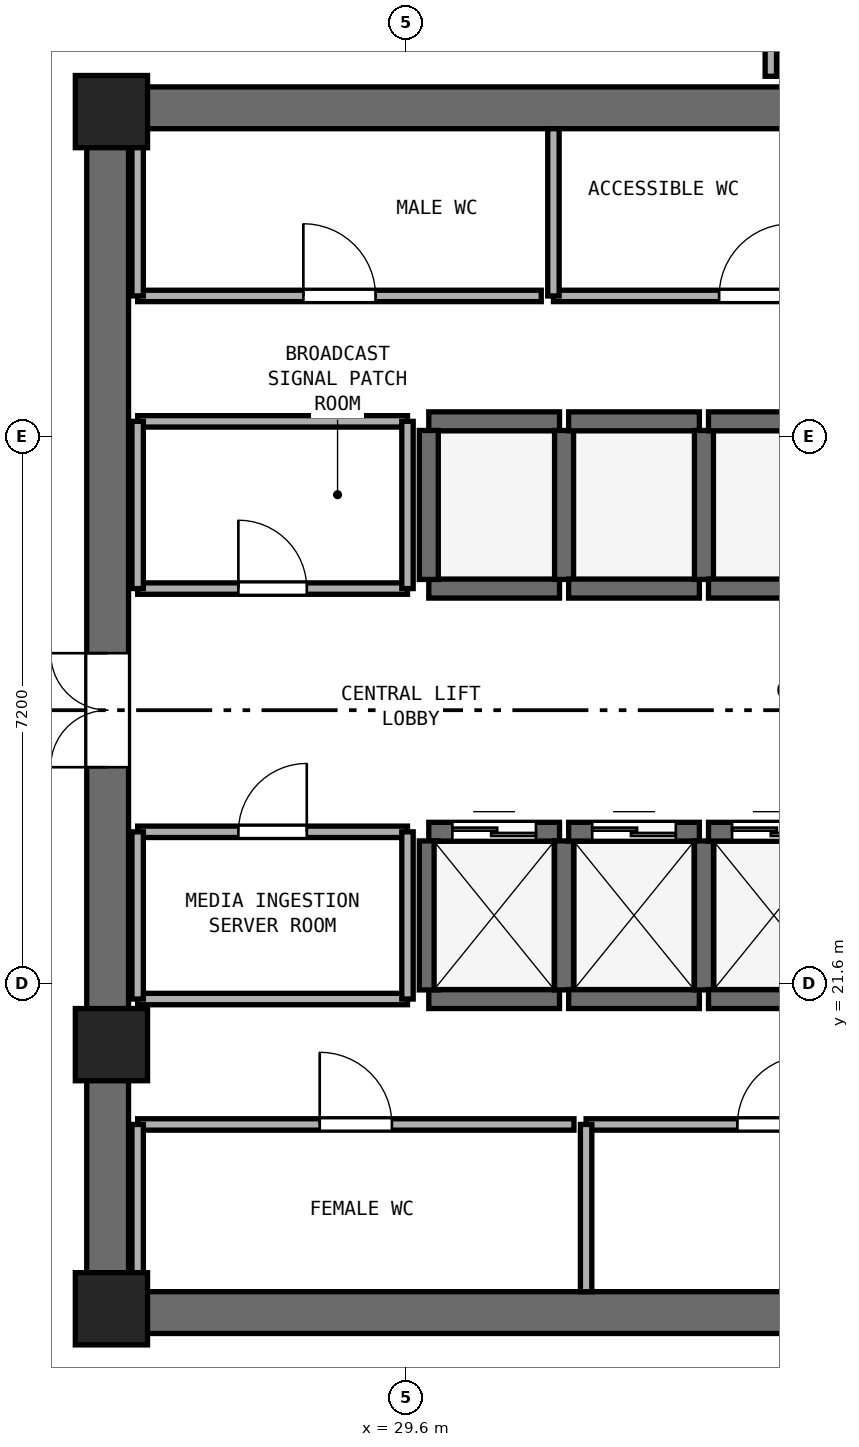
"""IFC4 building model, lengths in metres.
Left out: names, types, materials, properties, quantities, classifications, styles, units other than length and angle.
Written with IfcOpenShell. Run it as: python <this file> out.ifc"""

import sys

from ifc_helpers import new_model, si_unit, direction, frame, frame_2d, origin, origin_2d, place, context, subcontext, project, spatial, rectangle, extrude, element, fill, save


model = new_model("IFC4")
c1 = context("Model", 3, precision=1e-05, world=origin(), true_north=direction((0.0, 1.0)))
c2 = subcontext(c1, "Body", "Model", "MODEL_VIEW")
j1 = project(units=[si_unit("LENGTHUNIT", "METRE"), si_unit("PLANEANGLEUNIT", "RADIAN")], contexts=[c1])
p1 = place(None, origin())
s1 = spatial("IfcSite", under=j1, at=p1, CompositionType="ELEMENT")
p2 = place(p1, origin())
s2 = spatial("IfcBuilding", under=s1, at=p2, CompositionType="ELEMENT")
p3 = place(p2, frame((0.0, 0.0, 212.4)))
s3 = spatial("IfcBuildingStorey", under=s2, at=p3, CompositionType="ELEMENT", Elevation=212.4)
for number, where, z_axis, x_axis in (
    (1, (25.4, 17.275, 0.0), (0.0, 0.0, 1.0), (1.0, 0.0, 0.0)),
    (2, (25.4, 33.125, 0.0), (0.0, 0.0, 1.0), (1.0, 0.0, 0.0)),
):
    element("IfcWall", number, at=place(p3, frame(where, z_axis=z_axis, x_axis=x_axis)), inside=s3, PredefinedType="SHEAR", context=c2, shape_type="SweptSolid", body=[
        extrude(rectangle(XDim=23.2, YDim=0.55, at=frame_2d((11.6, 0.0))), origin(), (0.0, 0.0, 1.0), 3.54),
    ])
p4 = place(p3, frame((25.675, 17.55, 0.0), z_axis=(0.0, 0.0, 1.0), x_axis=(0.0, 1.0, 0.0)))
e3 = element("IfcWall", 3, at=p4, inside=s3, PredefinedType="SHEAR", context=c2, shape_type="SweptSolid", body=[
    extrude(rectangle(XDim=15.3, YDim=0.55, at=frame_2d((7.65, 0.0))), origin(), (0.0, 0.0, 1.0), 3.54),
])
p5 = place(p4, frame((6.9, 0.0, 0.0)))
e4 = element("IfcOpeningElement", 4, at=p5, cuts=e3, PredefinedType="OPENING", context=c2, shape_type="SweptSolid", body=[
    extrude(rectangle(XDim=1.5, YDim=2.15, at=frame_2d((0.75, 1.075))), frame((0.0, 0.285, 0.0), z_axis=(0.0, -1.0, 0.0), x_axis=(1.0, 0.0, 0.0)), (0.0, 0.0, 1.0), 0.57),
])
for number, where, z_axis, x_axis in (
    (5, (25.725, 17.325, 0.0), (0.0, 0.0, 1.0), (1.0, 0.0, 0.0)),
    (6, (25.725, 33.075, 0.0), (0.0, 0.0, 1.0), (1.0, 0.0, 0.0)),
    (7, (25.725, 20.8, 0.0), (0.0, 0.0, 1.0), (1.0, 0.0, 0.0)),
):
    element("IfcColumn", number, at=place(p3, frame(where, z_axis=z_axis, x_axis=x_axis)), inside=s3, PredefinedType="PILASTER", context=c2, shape_type="SweptSolid", body=[
        extrude(rectangle(XDim=0.95, YDim=0.95, at=origin_2d()), origin(), (0.0, 0.0, 1.0), 3.8),
    ])
p6 = place(p3, frame((29.9, 21.4, 0.0), z_axis=(0.0, 0.0, 1.0), x_axis=(1.0, 0.0, 0.0)))
e8 = element("IfcWall", 8, at=p6, inside=s3, PredefinedType="SHEAR", context=c2, shape_type="SweptSolid", body=[
    extrude(rectangle(XDim=1.72, YDim=0.25, at=frame_2d((0.86, 0.0))), origin(), (0.0, 0.0, 1.0), 3.54),
])
p7 = place(p3, frame((29.9, 23.6, 0.0), z_axis=(0.0, 0.0, 1.0), x_axis=(1.0, 0.0, 0.0)))
e9 = element("IfcWall", 9, at=p7, inside=s3, PredefinedType="SHEAR", context=c2, shape_type="SweptSolid", body=[
    extrude(rectangle(XDim=1.72, YDim=0.25, at=frame_2d((0.86, 0.0))), origin(), (0.0, 0.0, 1.0), 3.54),
])
p8 = place(p7, frame((0.31, 0.0, 0.0)))
e10 = element("IfcOpeningElement", 10, at=p8, cuts=e9, PredefinedType="OPENING", context=c2, shape_type="SweptSolid", body=[
    extrude(rectangle(XDim=1.1, YDim=2.15, at=frame_2d((0.55, 1.075))), frame((0.0, 0.135, 0.0), z_axis=(0.0, -1.0, 0.0), x_axis=(1.0, 0.0, 0.0)), (0.0, 0.0, 1.0), 0.27),
])
for number, where, z_axis, x_axis in (
    (11, (29.9, 21.52, 0.0), (0.0, 0.0, 1.0), (0.0, 1.0, 0.0)),
    (12, (31.68, 21.52, 0.0), (0.0, 0.0, 1.0), (0.0, 1.0, 0.0)),
):
    element("IfcWall", number, at=place(p3, frame(where, z_axis=z_axis, x_axis=x_axis)), inside=s3, PredefinedType="SHEAR", context=c2, shape_type="SweptSolid", body=[
        extrude(rectangle(XDim=1.96, YDim=0.25, at=frame_2d((0.98, 0.0))), origin(), (0.0, 0.0, 1.0), 3.54),
    ])
p9 = place(p3, frame((31.74, 21.4, 0.0), z_axis=(0.0, 0.0, 1.0), x_axis=(1.0, 0.0, 0.0)))
e13 = element("IfcWall", 13, at=p9, inside=s3, PredefinedType="SHEAR", context=c2, shape_type="SweptSolid", body=[
    extrude(rectangle(XDim=1.72, YDim=0.25, at=frame_2d((0.86, 0.0))), origin(), (0.0, 0.0, 1.0), 3.54),
])
p10 = place(p3, frame((31.74, 23.6, 0.0), z_axis=(0.0, 0.0, 1.0), x_axis=(1.0, 0.0, 0.0)))
e14 = element("IfcWall", 14, at=p10, inside=s3, PredefinedType="SHEAR", context=c2, shape_type="SweptSolid", body=[
    extrude(rectangle(XDim=1.72, YDim=0.25, at=frame_2d((0.86, 0.0))), origin(), (0.0, 0.0, 1.0), 3.54),
])
p11 = place(p10, frame((0.31, 0.0, 0.0)))
e15 = element("IfcOpeningElement", 15, at=p11, cuts=e14, PredefinedType="OPENING", context=c2, shape_type="SweptSolid", body=[
    extrude(rectangle(XDim=1.1, YDim=2.15, at=frame_2d((0.55, 1.075))), frame((0.0, 0.135, 0.0), z_axis=(0.0, -1.0, 0.0), x_axis=(1.0, 0.0, 0.0)), (0.0, 0.0, 1.0), 0.27),
])
p12 = place(p3, frame((33.52, 21.52, 0.0), z_axis=(0.0, 0.0, 1.0), x_axis=(0.0, 1.0, 0.0)))
e16 = element("IfcWall", 16, at=p12, inside=s3, PredefinedType="SHEAR", context=c2, shape_type="SweptSolid", body=[
    extrude(rectangle(XDim=1.96, YDim=0.25, at=frame_2d((0.98, 0.0))), origin(), (0.0, 0.0, 1.0), 3.54),
])
p13 = place(p3, frame((33.58, 21.4, 0.0), z_axis=(0.0, 0.0, 1.0), x_axis=(1.0, 0.0, 0.0)))
e17 = element("IfcWall", 17, at=p13, inside=s3, PredefinedType="SHEAR", context=c2, shape_type="SweptSolid", body=[
    extrude(rectangle(XDim=1.72, YDim=0.25, at=frame_2d((0.86, 0.0))), origin(), (0.0, 0.0, 1.0), 3.54),
])
p14 = place(p3, frame((33.58, 23.6, 0.0), z_axis=(0.0, 0.0, 1.0), x_axis=(1.0, 0.0, 0.0)))
e18 = element("IfcWall", 18, at=p14, inside=s3, PredefinedType="SHEAR", context=c2, shape_type="SweptSolid", body=[
    extrude(rectangle(XDim=1.72, YDim=0.25, at=frame_2d((0.86, 0.0))), origin(), (0.0, 0.0, 1.0), 3.54),
])
p15 = place(p14, frame((0.31, 0.0, 0.0)))
e19 = element("IfcOpeningElement", 19, at=p15, cuts=e18, PredefinedType="OPENING", context=c2, shape_type="SweptSolid", body=[
    extrude(rectangle(XDim=1.1, YDim=2.15, at=frame_2d((0.55, 1.075))), frame((0.0, 0.135, 0.0), z_axis=(0.0, -1.0, 0.0), x_axis=(1.0, 0.0, 0.0)), (0.0, 0.0, 1.0), 0.27),
])
for number, where, z_axis, x_axis in (
    (20, (29.9, 26.8, 0.0), (0.0, 0.0, 1.0), (1.0, 0.0, 0.0)),
    (21, (29.9, 29.0, 0.0), (0.0, 0.0, 1.0), (1.0, 0.0, 0.0)),
):
    element("IfcWall", number, at=place(p3, frame(where, z_axis=z_axis, x_axis=x_axis)), inside=s3, PredefinedType="SHEAR", context=c2, shape_type="SweptSolid", body=[
        extrude(rectangle(XDim=1.72, YDim=0.25, at=frame_2d((0.86, 0.0))), origin(), (0.0, 0.0, 1.0), 3.54),
    ])
for number, where, z_axis, x_axis in (
    (22, (29.9, 26.92, 0.0), (0.0, 0.0, 1.0), (0.0, 1.0, 0.0)),
    (23, (31.68, 26.92, 0.0), (0.0, 0.0, 1.0), (0.0, 1.0, 0.0)),
):
    element("IfcWall", number, at=place(p3, frame(where, z_axis=z_axis, x_axis=x_axis)), inside=s3, PredefinedType="SHEAR", context=c2, shape_type="SweptSolid", body=[
        extrude(rectangle(XDim=1.96, YDim=0.25, at=frame_2d((0.98, 0.0))), origin(), (0.0, 0.0, 1.0), 3.54),
    ])
for number, where, z_axis, x_axis in (
    (24, (31.74, 26.8, 0.0), (0.0, 0.0, 1.0), (1.0, 0.0, 0.0)),
    (25, (31.74, 29.0, 0.0), (0.0, 0.0, 1.0), (1.0, 0.0, 0.0)),
):
    element("IfcWall", number, at=place(p3, frame(where, z_axis=z_axis, x_axis=x_axis)), inside=s3, PredefinedType="SHEAR", context=c2, shape_type="SweptSolid", body=[
        extrude(rectangle(XDim=1.72, YDim=0.25, at=frame_2d((0.86, 0.0))), origin(), (0.0, 0.0, 1.0), 3.54),
    ])
p16 = place(p3, frame((33.52, 26.92, 0.0), z_axis=(0.0, 0.0, 1.0), x_axis=(0.0, 1.0, 0.0)))
e26 = element("IfcWall", 26, at=p16, inside=s3, PredefinedType="SHEAR", context=c2, shape_type="SweptSolid", body=[
    extrude(rectangle(XDim=1.96, YDim=0.25, at=frame_2d((0.98, 0.0))), origin(), (0.0, 0.0, 1.0), 3.54),
])
for number, where, z_axis, x_axis in (
    (27, (33.58, 26.8, 0.0), (0.0, 0.0, 1.0), (1.0, 0.0, 0.0)),
    (28, (33.58, 29.0, 0.0), (0.0, 0.0, 1.0), (1.0, 0.0, 0.0)),
):
    element("IfcWall", number, at=place(p3, frame(where, z_axis=z_axis, x_axis=x_axis)), inside=s3, PredefinedType="SHEAR", context=c2, shape_type="SweptSolid", body=[
        extrude(rectangle(XDim=1.72, YDim=0.25, at=frame_2d((0.86, 0.0))), origin(), (0.0, 0.0, 1.0), 3.54),
    ])
p17 = place(p3, frame((26.07, 30.65, 0.0), z_axis=(0.0, 0.0, 1.0), x_axis=(1.0, 0.0, 0.0)))
e29 = element("IfcWall", 29, at=p17, inside=s3, PredefinedType="PARTITIONING", context=c2, shape_type="SweptSolid", body=[
    extrude(rectangle(XDim=5.31, YDim=0.15, at=frame_2d((2.655, 0.0))), origin(), (0.0, 0.0, 1.0), 3.54),
])
p18 = place(p17, frame((2.18, 0.0, 0.0)))
e30 = element("IfcOpeningElement", 30, at=p18, cuts=e29, PredefinedType="OPENING", context=c2, shape_type="SweptSolid", body=[
    extrude(rectangle(XDim=0.95, YDim=2.1, at=frame_2d((0.475, 1.05))), frame((0.0, 0.085, 0.0), z_axis=(0.0, -1.0, 0.0), x_axis=(1.0, 0.0, 0.0)), (0.0, 0.0, 1.0), 0.17),
])
p19 = place(p3, frame((26.07, 30.65, 0.0), z_axis=(0.0, 0.0, 1.0), x_axis=(0.0, 1.0, 0.0)))
e31 = element("IfcWall", 31, at=p19, inside=s3, PredefinedType="PARTITIONING", context=c2, shape_type="SweptSolid", body=[
    extrude(rectangle(XDim=2.2, YDim=0.15, at=frame_2d((1.1, 0.0))), origin(), (0.0, 0.0, 1.0), 2.64),
])
p20 = place(p3, frame((31.54, 30.65, 0.0), z_axis=(0.0, 0.0, 1.0), x_axis=(1.0, 0.0, 0.0)))
e32 = element("IfcWall", 32, at=p20, inside=s3, PredefinedType="PARTITIONING", context=c2, shape_type="SweptSolid", body=[
    extrude(rectangle(XDim=5.31, YDim=0.15, at=frame_2d((2.655, 0.0))), origin(), (0.0, 0.0, 1.0), 3.54),
])
p21 = place(p20, frame((2.18, 0.0, 0.0)))
e33 = element("IfcOpeningElement", 33, at=p21, cuts=e32, PredefinedType="OPENING", context=c2, shape_type="SweptSolid", body=[
    extrude(rectangle(XDim=0.95, YDim=2.1, at=frame_2d((0.475, 1.05))), frame((0.0, 0.085, 0.0), z_axis=(0.0, -1.0, 0.0), x_axis=(1.0, 0.0, 0.0)), (0.0, 0.0, 1.0), 0.17),
])
p22 = place(p3, frame((31.54, 30.65, 0.0), z_axis=(0.0, 0.0, 1.0), x_axis=(0.0, 1.0, 0.0)))
e34 = element("IfcWall", 34, at=p22, inside=s3, PredefinedType="PARTITIONING", context=c2, shape_type="SweptSolid", body=[
    extrude(rectangle(XDim=2.2, YDim=0.15, at=frame_2d((1.1, 0.0))), origin(), (0.0, 0.0, 1.0), 3.54),
])
p23 = place(p3, frame((26.07, 19.75, 0.0), z_axis=(0.0, 0.0, 1.0), x_axis=(1.0, 0.0, 0.0)))
e35 = element("IfcWall", 35, at=p23, inside=s3, PredefinedType="PARTITIONING", context=c2, shape_type="SweptSolid", body=[
    extrude(rectangle(XDim=5.74, YDim=0.15, at=frame_2d((2.87, 0.0))), origin(), (0.0, 0.0, 1.0), 3.54),
])
p24 = place(p23, frame((2.395, 0.0, 0.0)))
e36 = element("IfcOpeningElement", 36, at=p24, cuts=e35, PredefinedType="OPENING", context=c2, shape_type="SweptSolid", body=[
    extrude(rectangle(XDim=0.95, YDim=2.1, at=frame_2d((0.475, 1.05))), frame((0.0, 0.085, 0.0), z_axis=(0.0, -1.0, 0.0), x_axis=(1.0, 0.0, 0.0)), (0.0, 0.0, 1.0), 0.17),
])
p25 = place(p3, frame((26.07, 17.55, 0.0), z_axis=(0.0, 0.0, 1.0), x_axis=(0.0, 1.0, 0.0)))
e37 = element("IfcWall", 37, at=p25, inside=s3, PredefinedType="PARTITIONING", context=c2, shape_type="SweptSolid", body=[
    extrude(rectangle(XDim=2.2, YDim=0.15, at=frame_2d((1.1, 0.0))), origin(), (0.0, 0.0, 1.0), 2.64),
])
p26 = place(p3, frame((31.97, 19.75, 0.0), z_axis=(0.0, 0.0, 1.0), x_axis=(1.0, 0.0, 0.0)))
e38 = element("IfcWall", 38, at=p26, inside=s3, PredefinedType="PARTITIONING", context=c2, shape_type="SweptSolid", body=[
    extrude(rectangle(XDim=4.88, YDim=0.15, at=frame_2d((2.44, 0.0))), origin(), (0.0, 0.0, 1.0), 3.54),
])
p27 = place(p26, frame((1.99, 0.0, 0.0)))
e39 = element("IfcOpeningElement", 39, at=p27, cuts=e38, PredefinedType="OPENING", context=c2, shape_type="SweptSolid", body=[
    extrude(rectangle(XDim=0.9, YDim=2.1, at=frame_2d((0.45, 1.05))), frame((0.0, 0.085, 0.0), z_axis=(0.0, -1.0, 0.0), x_axis=(1.0, 0.0, 0.0)), (0.0, 0.0, 1.0), 0.17),
])
p28 = place(p3, frame((31.97, 17.55, 0.0), z_axis=(0.0, 0.0, 1.0), x_axis=(0.0, 1.0, 0.0)))
e40 = element("IfcWall", 40, at=p28, inside=s3, PredefinedType="PARTITIONING", context=c2, shape_type="SweptSolid", body=[
    extrude(rectangle(XDim=2.2, YDim=0.15, at=frame_2d((1.1, 0.0))), origin(), (0.0, 0.0, 1.0), 3.54),
])
p29 = place(p3, frame((26.07, 26.8, 0.0), z_axis=(0.0, 0.0, 1.0), x_axis=(1.0, 0.0, 0.0)))
e41 = element("IfcWall", 41, at=p29, inside=s3, PredefinedType="PARTITIONING", context=c2, shape_type="SweptSolid", body=[
    extrude(rectangle(XDim=3.55, YDim=0.15, at=frame_2d((1.775, 0.0))), origin(), (0.0, 0.0, 1.0), 3.54),
])
p30 = place(p29, frame((1.325, 0.0, 0.0)))
e42 = element("IfcOpeningElement", 42, at=p30, cuts=e41, PredefinedType="OPENING", context=c2, shape_type="SweptSolid", body=[
    extrude(rectangle(XDim=0.9, YDim=2.1, at=frame_2d((0.45, 1.05))), frame((0.0, 0.085, 0.0), z_axis=(0.0, -1.0, 0.0), x_axis=(1.0, 0.0, 0.0)), (0.0, 0.0, 1.0), 0.17),
])
p31 = place(p3, frame((26.07, 29.0, 0.0), z_axis=(0.0, 0.0, 1.0), x_axis=(1.0, 0.0, 0.0)))
e43 = element("IfcWall", 43, at=p31, inside=s3, PredefinedType="PARTITIONING", context=c2, shape_type="SweptSolid", body=[
    extrude(rectangle(XDim=3.55, YDim=0.15, at=frame_2d((1.775, 0.0))), origin(), (0.0, 0.0, 1.0), 3.54),
])
p32 = place(p3, frame((26.07, 26.8, 0.0), z_axis=(0.0, 0.0, 1.0), x_axis=(0.0, 1.0, 0.0)))
e44 = element("IfcWall", 44, at=p32, inside=s3, PredefinedType="PARTITIONING", context=c2, shape_type="SweptSolid", body=[
    extrude(rectangle(XDim=2.2, YDim=0.15, at=frame_2d((1.1, 0.0))), origin(), (0.0, 0.0, 1.0), 2.64),
])
p33 = place(p3, frame((29.62, 26.8, 0.0), z_axis=(0.0, 0.0, 1.0), x_axis=(0.0, 1.0, 0.0)))
e45 = element("IfcWall", 45, at=p33, inside=s3, PredefinedType="PARTITIONING", context=c2, shape_type="SweptSolid", body=[
    extrude(rectangle(XDim=2.2, YDim=0.15, at=frame_2d((1.1, 0.0))), origin(), (0.0, 0.0, 1.0), 3.54),
])
p34 = place(p3, frame((26.07, 21.4, 0.0), z_axis=(0.0, 0.0, 1.0), x_axis=(1.0, 0.0, 0.0)))
e46 = element("IfcWall", 46, at=p34, inside=s3, PredefinedType="PARTITIONING", context=c2, shape_type="SweptSolid", body=[
    extrude(rectangle(XDim=3.55, YDim=0.15, at=frame_2d((1.775, 0.0))), origin(), (0.0, 0.0, 1.0), 3.54),
])
p35 = place(p3, frame((26.07, 23.6, 0.0), z_axis=(0.0, 0.0, 1.0), x_axis=(1.0, 0.0, 0.0)))
e47 = element("IfcWall", 47, at=p35, inside=s3, PredefinedType="PARTITIONING", context=c2, shape_type="SweptSolid", body=[
    extrude(rectangle(XDim=3.55, YDim=0.15, at=frame_2d((1.775, 0.0))), origin(), (0.0, 0.0, 1.0), 3.54),
])
p36 = place(p35, frame((1.325, 0.0, 0.0)))
e48 = element("IfcOpeningElement", 48, at=p36, cuts=e47, PredefinedType="OPENING", context=c2, shape_type="SweptSolid", body=[
    extrude(rectangle(XDim=0.9, YDim=2.1, at=frame_2d((0.45, 1.05))), frame((0.0, 0.085, 0.0), z_axis=(0.0, -1.0, 0.0), x_axis=(1.0, 0.0, 0.0)), (0.0, 0.0, 1.0), 0.17),
])
p37 = place(p3, frame((26.07, 21.4, 0.0), z_axis=(0.0, 0.0, 1.0), x_axis=(0.0, 1.0, 0.0)))
e49 = element("IfcWall", 49, at=p37, inside=s3, PredefinedType="PARTITIONING", context=c2, shape_type="SweptSolid", body=[
    extrude(rectangle(XDim=2.2, YDim=0.15, at=frame_2d((1.1, 0.0))), origin(), (0.0, 0.0, 1.0), 2.64),
])
p38 = place(p3, frame((29.62, 21.4, 0.0), z_axis=(0.0, 0.0, 1.0), x_axis=(0.0, 1.0, 0.0)))
e50 = element("IfcWall", 50, at=p38, inside=s3, PredefinedType="PARTITIONING", context=c2, shape_type="SweptSolid", body=[
    extrude(rectangle(XDim=2.2, YDim=0.15, at=frame_2d((1.1, 0.0))), origin(), (0.0, 0.0, 1.0), 3.54),
])
p39 = place(p3, frame((34.4, 33.54, 0.0), z_axis=(0.0, 0.0, 1.0), x_axis=(0.0, 1.0, 0.0)))
e51 = element("IfcWall", 51, at=p39, inside=s3, PredefinedType="PARTITIONING", context=c2, shape_type="SweptSolid", body=[
    extrude(rectangle(XDim=2.76, YDim=0.15, at=frame_2d((1.38, 0.0))), origin(), (0.0, 0.0, 1.0), 3.54),
])
p40 = place(p8, origin())
e52 = element("IfcDoor", 52, at=p40, inside=s3, OperationType="DOUBLE_DOOR_SLIDING", PredefinedType="DOOR", context=c2, shape_type="SweptSolid", body=[
    extrude(rectangle(XDim=1.1, YDim=2.15, at=frame_2d((0.55, 1.075))), frame((0.0, 0.025, 0.0), z_axis=(0.0, -1.0, 0.0), x_axis=(1.0, 0.0, 0.0)), (0.0, 0.0, 1.0), 0.05),
])
fill(e10, e52)
p41 = place(p11, origin())
e53 = element("IfcDoor", 53, at=p41, inside=s3, OperationType="DOUBLE_DOOR_SLIDING", PredefinedType="DOOR", context=c2, shape_type="SweptSolid", body=[
    extrude(rectangle(XDim=1.1, YDim=2.15, at=frame_2d((0.55, 1.075))), frame((0.0, 0.025, 0.0), z_axis=(0.0, -1.0, 0.0), x_axis=(1.0, 0.0, 0.0)), (0.0, 0.0, 1.0), 0.05),
])
fill(e15, e53)
p42 = place(p15, origin())
e54 = element("IfcDoor", 54, at=p42, inside=s3, OperationType="DOUBLE_DOOR_SLIDING", PredefinedType="DOOR", context=c2, shape_type="SweptSolid", body=[
    extrude(rectangle(XDim=1.1, YDim=2.15, at=frame_2d((0.55, 1.075))), frame((0.0, 0.025, 0.0), z_axis=(0.0, -1.0, 0.0), x_axis=(1.0, 0.0, 0.0)), (0.0, 0.0, 1.0), 0.05),
])
fill(e19, e54)
p43 = place(p5, origin())
e55 = element("IfcDoor", 55, at=p43, inside=s3, OperationType="DOUBLE_DOOR_SINGLE_SWING", PredefinedType="DOOR", context=c2, shape_type="SweptSolid", body=[
    extrude(rectangle(XDim=1.5, YDim=2.15, at=frame_2d((0.75, 1.075))), frame((0.0, 0.025, 0.0), z_axis=(0.0, -1.0, 0.0), x_axis=(1.0, 0.0, 0.0)), (0.0, 0.0, 1.0), 0.05),
])
fill(e4, e55)
p44 = place(p18, origin())
e56 = element("IfcDoor", 56, at=p44, inside=s3, OperationType="SINGLE_SWING_LEFT", PredefinedType="DOOR", context=c2, shape_type="SweptSolid", body=[
    extrude(rectangle(XDim=0.95, YDim=2.1, at=frame_2d((0.475, 1.05))), frame((0.0, 0.025, 0.0), z_axis=(0.0, -1.0, 0.0), x_axis=(1.0, 0.0, 0.0)), (0.0, 0.0, 1.0), 0.05),
])
fill(e30, e56)
p45 = place(p21, origin())
e57 = element("IfcDoor", 57, at=p45, inside=s3, OperationType="SINGLE_SWING_RIGHT", PredefinedType="DOOR", context=c2, shape_type="SweptSolid", body=[
    extrude(rectangle(XDim=0.95, YDim=2.1, at=frame_2d((0.475, 1.05))), frame((0.0, 0.025, 0.0), z_axis=(0.0, -1.0, 0.0), x_axis=(1.0, 0.0, 0.0)), (0.0, 0.0, 1.0), 0.05),
])
fill(e33, e57)
p46 = place(p24, origin())
e58 = element("IfcDoor", 58, at=p46, inside=s3, OperationType="SINGLE_SWING_LEFT", PredefinedType="DOOR", context=c2, shape_type="SweptSolid", body=[
    extrude(rectangle(XDim=0.95, YDim=2.1, at=frame_2d((0.475, 1.05))), frame((0.0, 0.025, 0.0), z_axis=(0.0, -1.0, 0.0), x_axis=(1.0, 0.0, 0.0)), (0.0, 0.0, 1.0), 0.05),
])
fill(e36, e58)
p47 = place(p27, origin())
e59 = element("IfcDoor", 59, at=p47, inside=s3, OperationType="SINGLE_SWING_RIGHT", PredefinedType="DOOR", context=c2, shape_type="SweptSolid", body=[
    extrude(rectangle(XDim=0.9, YDim=2.1, at=frame_2d((0.45, 1.05))), frame((0.0, 0.025, 0.0), z_axis=(0.0, -1.0, 0.0), x_axis=(1.0, 0.0, 0.0)), (0.0, 0.0, 1.0), 0.05),
])
fill(e39, e59)
p48 = place(p30, origin())
e60 = element("IfcDoor", 60, at=p48, inside=s3, OperationType="SINGLE_SWING_LEFT", PredefinedType="DOOR", context=c2, shape_type="SweptSolid", body=[
    extrude(rectangle(XDim=0.9, YDim=2.1, at=frame_2d((0.45, 1.05))), frame((0.0, 0.025, 0.0), z_axis=(0.0, -1.0, 0.0), x_axis=(1.0, 0.0, 0.0)), (0.0, 0.0, 1.0), 0.05),
])
fill(e42, e60)
p49 = place(p36, origin())
e61 = element("IfcDoor", 61, at=p49, inside=s3, OperationType="SINGLE_SWING_RIGHT", PredefinedType="DOOR", context=c2, shape_type="SweptSolid", body=[
    extrude(rectangle(XDim=0.9, YDim=2.1, at=frame_2d((0.45, 1.05))), frame((0.0, 0.025, 0.0), z_axis=(0.0, -1.0, 0.0), x_axis=(1.0, 0.0, 0.0)), (0.0, 0.0, 1.0), 0.05),
])
fill(e48, e61)
save(model, sys.argv[1])
